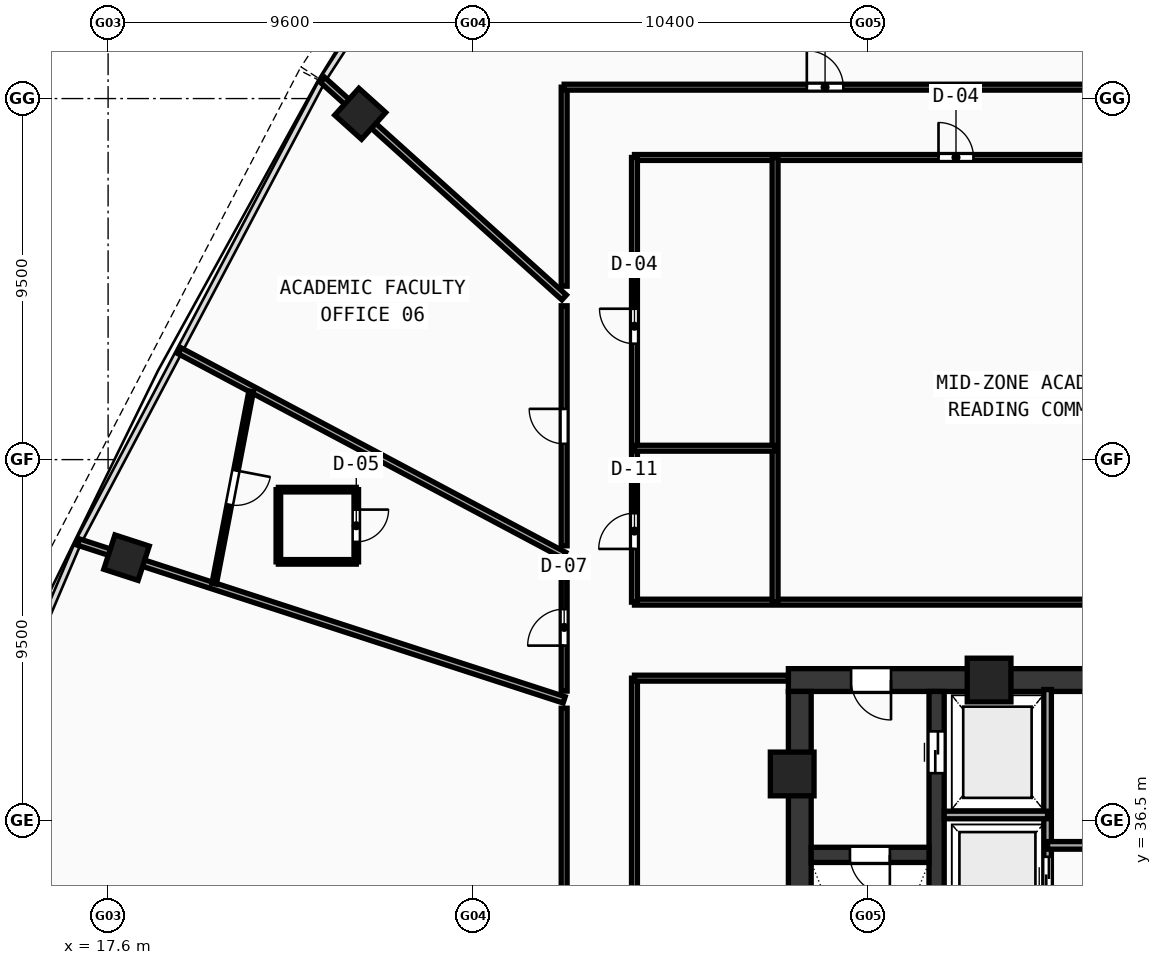
"""IFC4 building model, lengths in metres.
Left out: names, types, materials, properties, quantities, classifications, styles, units other than length and angle.
Written with IfcOpenShell. Run it as: python <this file> out.ifc"""

import sys

from ifc_helpers import new_model, si_unit, direction, frame, frame_2d, origin, origin_with_axes, origin_2d, place, context, subcontext, project, spatial, rectangle, hollow_rectangle, extrude, source, transform, mapped, element, fill, save


model = new_model("IFC4")
c1 = context("Model", 3, precision=1e-05, world=origin(), true_north=direction((0.0, 1.0)))
c2 = subcontext(c1, "Body", "Model", "MODEL_VIEW")
j1 = project(units=[si_unit("LENGTHUNIT", "METRE"), si_unit("PLANEANGLEUNIT", "RADIAN")], contexts=[c1])
p1 = place(None, origin())
s1 = spatial("IfcSite", under=j1, at=p1, CompositionType="ELEMENT")
p2 = place(p1, origin())
s2 = spatial("IfcBuilding", under=s1, at=p2, CompositionType="ELEMENT")
p3 = place(p2, frame((0.0, 0.0, 155.59)))
s3 = spatial("IfcBuildingStorey", under=s2, at=p3, CompositionType="ELEMENT", Elevation=155.59)
p4 = place(p3, frame((35.5, 40.2, 0.0), z_axis=(0.0, 0.0, 1.0), x_axis=(1.0, 0.0, 0.0)))
e1 = element("IfcWall", 1, at=p4, inside=s3, PredefinedType="SHEAR", context=c2, shape_type="SweptSolid", body=[
    extrude(rectangle(XDim=11.3, YDim=0.6, at=frame_2d((5.65, 0.0))), origin(), (0.0, 0.0, 1.0), 3.42),
])
p5 = place(p4, frame((1.65, 0.0, 0.0)))
e2 = element("IfcOpeningElement", 2, at=p5, cuts=e1, PredefinedType="OPENING", context=c2, shape_type="SweptSolid", body=[
    extrude(rectangle(XDim=1.05, YDim=2.1, at=frame_2d((0.525, 1.05))), frame((0.0, 0.31, 0.0), z_axis=(0.0, -1.0, 0.0), x_axis=(1.0, 0.0, 0.0)), (0.0, 0.0, 1.0), 0.62),
])
p6 = place(p3, frame((35.8, 27.8, 0.0), z_axis=(0.0, 0.0, 1.0), x_axis=(0.0, 1.0, 0.0)))
e3 = element("IfcWall", 3, at=p6, inside=s3, PredefinedType="SHEAR", context=c2, shape_type="SweptSolid", body=[
    extrude(rectangle(XDim=12.1, YDim=0.6, at=frame_2d((6.05, 0.0))), origin(), (0.0, 0.0, 1.0), 3.42),
])
p7 = place(p3, frame((39.4, 27.8, 0.0), z_axis=(0.0, 0.0, 1.0), x_axis=(0.0, 1.0, 0.0)))
e4 = element("IfcWall", 4, at=p7, inside=s3, PredefinedType="SHEAR", context=c2, shape_type="SweptSolid", body=[
    extrude(rectangle(XDim=12.1, YDim=0.4, at=frame_2d((6.05, 0.0))), origin(), (0.0, 0.0, 1.0), 3.42),
])
p8 = place(p7, frame((9.95, 0.0, 0.0)))
e5 = element("IfcOpeningElement", 5, at=p8, cuts=e4, PredefinedType="OPENING", context=c2, shape_type="SweptSolid", body=[
    extrude(rectangle(XDim=1.1, YDim=2.1, at=frame_2d((0.55, 1.05))), frame((0.0, 0.21, 0.0), z_axis=(0.0, -1.0, 0.0), x_axis=(1.0, 0.0, 0.0)), (0.0, 0.0, 1.0), 0.42),
])
p9 = place(p3, frame((36.1, 35.6, 0.0), z_axis=(0.0, 0.0, 1.0), x_axis=(1.0, 0.0, 0.0)))
e6 = element("IfcWall", 6, at=p9, inside=s3, PredefinedType="SHEAR", context=c2, shape_type="SweptSolid", body=[
    extrude(rectangle(XDim=3.1, YDim=0.4, at=frame_2d((1.55, 0.0))), origin(), (0.0, 0.0, 1.0), 3.42),
])
p10 = place(p9, frame((1.02, 0.0, 0.0)))
e7 = element("IfcOpeningElement", 7, at=p10, cuts=e6, PredefinedType="OPENING", context=c2, shape_type="SweptSolid", body=[
    extrude(rectangle(XDim=1.05, YDim=2.1, at=frame_2d((0.525, 1.05))), frame((0.0, 0.21, 0.0), z_axis=(0.0, -1.0, 0.0), x_axis=(1.0, 0.0, 0.0)), (0.0, 0.0, 1.0), 0.42),
])
m1 = source(origin(), c2, "Body", "SweptSolid", [
    extrude(hollow_rectangle(XDim=1.15, YDim=1.15, WallThickness=0.048, at=origin_2d()), origin(), (0.0, 0.0, 1.0), 3.68),
])
for number, where, z_axis, x_axis in (
    (8, (40.781, 40.2, -0.26), (0.0, 0.0, 1.0), (1.0, 0.0, 0.0)),
    (9, (35.6, 37.729, -0.26), (0.0, 0.0, 1.0), (1.0, 0.0, 0.0)),
):
    element("IfcColumn", number, at=place(p3, frame(where, z_axis=z_axis, x_axis=x_axis)), inside=s3, PredefinedType="COLUMN", context=c2, shape_type="MappedRepresentation", body=[
        mapped(m1, transform((0.0, 0.0, 0.0), scale=1.0)),
    ])
m2 = source(origin(), c2, "Body", "SweptSolid", [
    extrude(hollow_rectangle(XDim=0.95, YDim=0.95, WallThickness=0.04, at=origin_2d()), origin(), (0.0, 0.0, 1.0), 3.68),
])
for number, where, z_axis, x_axis in (
    (10, (24.234, 55.099, -0.26), (0.0, 0.0, 1.0), (-0.669, -0.743, 0.0)),
    (11, (18.085, 43.42, -0.26), (0.0, 0.0, 1.0), (-0.309, -0.951, 0.0)),
):
    element("IfcColumn", number, at=place(p3, frame(where, z_axis=z_axis, x_axis=x_axis)), inside=s3, PredefinedType="COLUMN", context=c2, shape_type="MappedRepresentation", body=[
        mapped(m2, transform((0.0, 0.0, 0.0), scale=1.0)),
    ])
p11 = place(p3, frame((42.32, 33.5, 0.0), z_axis=(0.0, 0.0, 1.0), x_axis=(0.0, 1.0, 0.0)))
e12 = element("IfcWall", 12, at=p11, inside=s3, PredefinedType="SOLIDWALL", context=c2, shape_type="SweptSolid", body=[
    extrude(rectangle(XDim=6.45, YDim=0.2, at=frame_2d((3.225, 0.0))), origin(), (0.0, 0.0, 1.0), 3.42),
])
p12 = place(p11, frame((1.0, 0.0, 0.0)))
e13 = element("IfcOpeningElement", 13, at=p12, cuts=e12, PredefinedType="OPENING", context=c2, shape_type="SweptSolid", body=[
    extrude(rectangle(XDim=1.05, YDim=2.1, at=frame_2d((0.525, 1.05))), frame((0.0, 0.11, 0.0), z_axis=(0.0, -1.0, 0.0), x_axis=(1.0, 0.0, 0.0)), (0.0, 0.0, 1.0), 0.22),
])
p13 = place(p3, frame((39.6, 36.65, 0.0), z_axis=(0.0, 0.0, 1.0), x_axis=(1.0, 0.0, 0.0)))
e14 = element("IfcWall", 14, at=p13, inside=s3, PredefinedType="SOLIDWALL", context=c2, shape_type="SweptSolid", body=[
    extrude(rectangle(XDim=2.72, YDim=0.2, at=frame_2d((1.36, 0.0))), origin(), (0.0, 0.0, 1.0), 3.42),
])
p14 = place(p3, frame((42.32, 35.85, 0.0), z_axis=(0.0, 0.0, 1.0), x_axis=(1.0, 0.0, 0.0)))
e15 = element("IfcWall", 15, at=p14, inside=s3, PredefinedType="SOLIDWALL", context=c2, shape_type="SweptSolid", body=[
    extrude(rectangle(XDim=4.73, YDim=0.2, at=frame_2d((2.365, 0.0))), origin(), (0.0, 0.0, 1.0), 3.42),
])
p15 = place(p14, frame((1.8, 0.0, 0.0)))
e16 = element("IfcOpeningElement", 16, at=p15, cuts=e15, PredefinedType="OPENING", context=c2, shape_type="SweptSolid", body=[
    extrude(rectangle(XDim=0.9, YDim=2.1, at=frame_2d((0.45, 1.05))), frame((0.0, 0.11, 0.0), z_axis=(0.0, -1.0, 0.0), x_axis=(1.0, 0.0, 0.0)), (0.0, 0.0, 1.0), 0.22),
])
p16 = place(p3, frame((31.45, 42.25, 0.0), z_axis=(0.0, 0.0, 1.0), x_axis=(1.0, 0.0, 0.0)))
e17 = element("IfcWall", 17, at=p16, inside=s3, PredefinedType="PARTITIONING", context=c2, shape_type="SweptSolid", body=[
    extrude(rectangle(XDim=33.1, YDim=0.155, at=frame_2d((16.55, 0.0))), origin(), (0.0, 0.0, 1.0), 2.77),
])
p17 = place(p3, frame((31.45, 53.95, 0.0), z_axis=(0.0, 0.0, 1.0), x_axis=(1.0, 0.0, 0.0)))
e18 = element("IfcWall", 18, at=p17, inside=s3, PredefinedType="PARTITIONING", context=c2, shape_type="SweptSolid", body=[
    extrude(rectangle(XDim=33.1, YDim=0.155, at=frame_2d((16.55, 0.0))), origin(), (0.0, 0.0, 1.0), 2.77),
])
p18 = place(p17, frame((8.0, 0.0, 0.0)))
e19 = element("IfcOpeningElement", 19, at=p18, cuts=e18, PredefinedType="OPENING", context=c2, shape_type="SweptSolid", body=[
    extrude(rectangle(XDim=0.92, YDim=2.1, at=frame_2d((0.46, 1.05))), frame((0.0, 0.087, 0.0), z_axis=(0.0, -1.0, 0.0), x_axis=(1.0, 0.0, 0.0)), (0.0, 0.0, 1.0), 0.175),
])
p19 = place(p17, frame((20.55, 0.0, 0.0)))
e20 = element("IfcOpeningElement", 20, at=p19, cuts=e18, PredefinedType="OPENING", context=c2, shape_type="SweptSolid", body=[
    extrude(rectangle(XDim=0.92, YDim=2.1, at=frame_2d((0.46, 1.05))), frame((0.0, 0.087, 0.0), z_axis=(0.0, -1.0, 0.0), x_axis=(1.0, 0.0, 0.0)), (0.0, 0.0, 1.0), 0.175),
])
p20 = place(p3, frame((31.45, 42.25, 0.0), z_axis=(0.0, 0.0, 1.0), x_axis=(0.0, 1.0, 0.0)))
e21 = element("IfcWall", 21, at=p20, inside=s3, PredefinedType="PARTITIONING", context=c2, shape_type="SweptSolid", body=[
    extrude(rectangle(XDim=11.7, YDim=0.155, at=frame_2d((5.85, 0.0))), origin(), (0.0, 0.0, 1.0), 2.77),
])
p21 = place(p20, frame((1.4, 0.0, 0.0)))
e22 = element("IfcOpeningElement", 22, at=p21, cuts=e21, PredefinedType="OPENING", context=c2, shape_type="SweptSolid", body=[
    extrude(rectangle(XDim=0.94, YDim=2.1, at=frame_2d((0.47, 1.05))), frame((0.0, 0.087, 0.0), z_axis=(0.0, -1.0, 0.0), x_axis=(1.0, 0.0, 0.0)), (0.0, 0.0, 1.0), 0.175),
])
p22 = place(p20, frame((6.8, 0.0, 0.0)))
e23 = element("IfcOpeningElement", 23, at=p22, cuts=e21, PredefinedType="OPENING", context=c2, shape_type="SweptSolid", body=[
    extrude(rectangle(XDim=0.92, YDim=2.1, at=frame_2d((0.46, 1.05))), frame((0.0, 0.087, 0.0), z_axis=(0.0, -1.0, 0.0), x_axis=(1.0, 0.0, 0.0)), (0.0, 0.0, 1.0), 0.175),
])
p23 = place(p3, frame((35.15, 42.25, 0.0), z_axis=(0.0, 0.0, 1.0), x_axis=(0.0, 1.0, 0.0)))
e24 = element("IfcWall", 24, at=p23, inside=s3, PredefinedType="PARTITIONING", context=c2, shape_type="SweptSolid", body=[
    extrude(rectangle(XDim=11.7, YDim=0.155, at=frame_2d((5.85, 0.0))), origin(), (0.0, 0.0, 1.0), 2.77),
])
p24 = place(p3, frame((31.45, 46.3, 0.0), z_axis=(0.0, 0.0, 1.0), x_axis=(1.0, 0.0, 0.0)))
e25 = element("IfcWall", 25, at=p24, inside=s3, PredefinedType="PARTITIONING", context=c2, shape_type="SweptSolid", body=[
    extrude(rectangle(XDim=3.7, YDim=0.155, at=frame_2d((1.85, 0.0))), origin(), (0.0, 0.0, 1.0), 2.77),
])
p25 = place(p3, frame((31.45, 23.65, 0.0), z_axis=(0.0, 0.0, 1.0), x_axis=(0.0, 1.0, 0.0)))
e26 = element("IfcWall", 26, at=p25, inside=s3, PredefinedType="PARTITIONING", context=c2, shape_type="SweptSolid", body=[
    extrude(rectangle(XDim=16.6, YDim=0.155, at=frame_2d((8.3, 0.0))), origin(), (0.0, 0.0, 1.0), 2.77),
])
p26 = place(p25, frame((7.5, 0.0, 0.0)))
e27 = element("IfcOpeningElement", 27, at=p26, cuts=e26, PredefinedType="OPENING", context=c2, shape_type="SweptSolid", body=[
    extrude(rectangle(XDim=0.9, YDim=2.08, at=frame_2d((0.45, 1.04))), frame((0.0, 0.087, 0.0), z_axis=(0.0, -1.0, 0.0), x_axis=(1.0, 0.0, 0.0)), (0.0, 0.0, 1.0), 0.175),
])
p27 = place(p3, frame((31.45, 40.25, 0.0), z_axis=(0.0, 0.0, 1.0), x_axis=(1.0, 0.0, 0.0)))
e28 = element("IfcWall", 28, at=p27, inside=s3, PredefinedType="PARTITIONING", context=c2, shape_type="SweptSolid", body=[
    extrude(rectangle(XDim=4.05, YDim=0.155, at=frame_2d((2.025, 0.0))), origin(), (0.0, 0.0, 1.0), 3.42),
])
p28 = place(p3, frame((29.6, 50.267, 0.0), z_axis=(0.0, 0.0, 1.0), x_axis=(-0.743147926867, 0.669127161901, 0.0)))
e29 = element("IfcWall", 29, at=p28, inside=s3, PredefinedType="PARTITIONING", context=c2, shape_type="SweptSolid", body=[
    extrude(rectangle(XDim=8.552, YDim=0.175, at=frame_2d((4.276, 0.0))), origin(), (0.0, 0.0, 1.0), 2.77),
])
p29 = place(p3, frame((29.6, 43.483, 0.0), z_axis=(0.0, 0.0, 1.0), x_axis=(-0.882944706502, 0.469476991193, 0.0)))
e30 = element("IfcWall", 30, at=p29, inside=s3, PredefinedType="PARTITIONING", context=c2, shape_type="SweptSolid", body=[
    extrude(rectangle(XDim=11.464, YDim=0.175, at=frame_2d((5.732, 0.0))), origin(), (0.0, 0.0, 1.0), 2.77),
])
p30 = place(p3, frame((29.6, 39.678, 0.0), z_axis=(0.0, 0.0, 1.0), x_axis=(-0.951059027278, 0.309009266259, 0.0)))
e31 = element("IfcWall", 31, at=p30, inside=s3, PredefinedType="PARTITIONING", context=c2, shape_type="SweptSolid", body=[
    extrude(rectangle(XDim=13.441, YDim=0.175, at=frame_2d((6.72, 0.0))), origin(), (0.0, 0.0, 1.0), 2.77),
])
p31 = place(p3, frame((29.6, 21.8, 0.0), z_axis=(0.0, 0.0, 1.0), x_axis=(0.0, 1.0, 0.0)))
e32 = element("IfcWall", 32, at=p31, inside=s3, PredefinedType="PARTITIONING", context=c2, shape_type="SweptSolid", body=[
    extrude(rectangle(XDim=17.659, YDim=0.155, at=frame_2d((8.829, 0.0))), origin(), (0.0, 0.0, 1.0), 2.77),
])
p32 = place(p31, frame((8.234, 0.0, 0.0)))
e33 = element("IfcOpeningElement", 33, at=p32, cuts=e32, PredefinedType="OPENING", context=c2, shape_type="SweptSolid", body=[
    extrude(rectangle(XDim=0.96, YDim=2.12, at=frame_2d((0.48, 1.06))), frame((0.0, 0.087, 0.0), z_axis=(0.0, -1.0, 0.0), x_axis=(1.0, 0.0, 0.0)), (0.0, 0.0, 1.0), 0.175),
])
p33 = place(p3, frame((29.6, 39.91, 0.0), z_axis=(0.0, 0.0, 1.0), x_axis=(0.0, 1.0, 0.0)))
e34 = element("IfcWall", 34, at=p33, inside=s3, PredefinedType="PARTITIONING", context=c2, shape_type="SweptSolid", body=[
    extrude(rectangle(XDim=3.354, YDim=0.155, at=frame_2d((1.677, 0.0))), origin(), (0.0, 0.0, 1.0), 3.02),
])
p34 = place(p33, frame((1.196, 0.0, 0.0)))
e35 = element("IfcOpeningElement", 35, at=p34, cuts=e34, PredefinedType="OPENING", context=c2, shape_type="SweptSolid", body=[
    extrude(rectangle(XDim=0.96, YDim=2.12, at=frame_2d((0.48, 1.06))), frame((0.0, 0.087, 0.0), z_axis=(0.0, -1.0, 0.0), x_axis=(1.0, 0.0, 0.0)), (0.0, 0.0, 1.0), 0.175),
])
p35 = place(p3, frame((29.6, 43.733, 0.0), z_axis=(0.0, 0.0, 1.0), x_axis=(0.0, 1.0, 0.0)))
e36 = element("IfcWall", 36, at=p35, inside=s3, PredefinedType="PARTITIONING", context=c2, shape_type="SweptSolid", body=[
    extrude(rectangle(XDim=6.315, YDim=0.155, at=frame_2d((3.157, 0.0))), origin(), (0.0, 0.0, 1.0), 2.77),
])
p36 = place(p35, frame((2.683, 0.0, 0.0)))
e37 = element("IfcOpeningElement", 37, at=p36, cuts=e36, PredefinedType="OPENING", context=c2, shape_type="SweptSolid", body=[
    extrude(rectangle(XDim=0.92, YDim=2.1, at=frame_2d((0.46, 1.05))), frame((0.0, 0.087, 0.0), z_axis=(0.0, -1.0, 0.0), x_axis=(1.0, 0.0, 0.0)), (0.0, 0.0, 1.0), 0.175),
])
p37 = place(p3, frame((29.6, 50.563, 0.0), z_axis=(0.0, 0.0, 1.0), x_axis=(0.0, 1.0, 0.0)))
e38 = element("IfcWall", 38, at=p37, inside=s3, PredefinedType="PARTITIONING", context=c2, shape_type="SweptSolid", body=[
    extrude(rectangle(XDim=5.237, YDim=0.155, at=frame_2d((2.618, 0.0))), origin(), (0.0, 0.0, 1.0), 3.02),
])
p38 = place(p3, frame((29.6, 55.8, 0.0), z_axis=(0.0, 0.0, 1.0), x_axis=(1.0, 0.0, 0.0)))
e39 = element("IfcWall", 39, at=p38, inside=s3, PredefinedType="PARTITIONING", context=c2, shape_type="SweptSolid", body=[
    extrude(rectangle(XDim=14.109, YDim=0.155, at=frame_2d((7.054, 0.0))), origin(), (0.0, 0.0, 1.0), 2.77),
])
p39 = place(p38, frame((6.385, 0.0, 0.0)))
e40 = element("IfcOpeningElement", 40, at=p39, cuts=e39, PredefinedType="OPENING", context=c2, shape_type="SweptSolid", body=[
    extrude(rectangle(XDim=0.96, YDim=2.12, at=frame_2d((0.48, 1.06))), frame((0.0, 0.087, 0.0), z_axis=(0.0, -1.0, 0.0), x_axis=(1.0, 0.0, 0.0)), (0.0, 0.0, 1.0), 0.175),
])
p40 = place(p3, frame((22.08, 43.31, 0.0), z_axis=(0.0, 0.0, 1.0), x_axis=(1.0, 0.0, 0.0)))
e41 = element("IfcWall", 41, at=p40, inside=s3, PredefinedType="PARTITIONING", context=c2, shape_type="SweptSolid", body=[
    extrude(rectangle(XDim=2.05, YDim=0.12, at=frame_2d((1.025, 0.0))), origin(), (0.0, 0.0, 1.0), 3.42),
])
p41 = place(p3, frame((24.13, 43.31, 0.0), z_axis=(0.0, 0.0, 1.0), x_axis=(0.0, 1.0, 0.0)))
e42 = element("IfcWall", 42, at=p41, inside=s3, PredefinedType="PARTITIONING", context=c2, shape_type="SweptSolid", body=[
    extrude(rectangle(XDim=1.9, YDim=0.12, at=frame_2d((0.95, 0.0))), origin(), (0.0, 0.0, 1.0), 3.42),
])
p42 = place(p41, frame((0.525, 0.0, 0.0)))
e43 = element("IfcOpeningElement", 43, at=p42, cuts=e42, PredefinedType="OPENING", context=c2, shape_type="SweptSolid", body=[
    extrude(rectangle(XDim=0.85, YDim=2.1, at=frame_2d((0.425, 1.05))), frame((0.0, 0.07, 0.0), z_axis=(0.0, -1.0, 0.0), x_axis=(1.0, 0.0, 0.0)), (0.0, 0.0, 1.0), 0.14),
])
p43 = place(p3, frame((24.13, 45.21, 0.0), z_axis=(0.0, 0.0, 1.0), x_axis=(-1.0, 0.0, 0.0)))
e44 = element("IfcWall", 44, at=p43, inside=s3, PredefinedType="PARTITIONING", context=c2, shape_type="SweptSolid", body=[
    extrude(rectangle(XDim=2.05, YDim=0.12, at=frame_2d((1.025, 0.0))), origin(), (0.0, 0.0, 1.0), 3.42),
])
p44 = place(p3, frame((22.08, 45.21, 0.0), z_axis=(0.0, 0.0, 1.0), x_axis=(0.0, -1.0, 0.0)))
e45 = element("IfcWall", 45, at=p44, inside=s3, PredefinedType="PARTITIONING", context=c2, shape_type="SweptSolid", body=[
    extrude(rectangle(XDim=1.9, YDim=0.12, at=frame_2d((0.95, 0.0))), origin(), (0.0, 0.0, 1.0), 3.42),
])
p45 = place(p3, frame((21.364, 47.795, 0.0), z_axis=(0.0, 0.0, 1.0), x_axis=(-0.188731428073, -0.982028740953, 0.0)))
e46 = element("IfcWall", 46, at=p45, inside=s3, PredefinedType="PARTITIONING", context=c2, shape_type="SweptSolid", body=[
    extrude(rectangle(XDim=5.154, YDim=0.12, at=frame_2d((2.577, 0.0))), origin(), (0.0, 0.0, 1.0), 2.77),
])
p46 = place(p45, frame((2.117, 0.0, 0.0)))
e47 = element("IfcOpeningElement", 47, at=p46, cuts=e46, PredefinedType="OPENING", context=c2, shape_type="SweptSolid", body=[
    extrude(rectangle(XDim=0.92, YDim=2.1, at=frame_2d((0.46, 1.05))), frame((0.0, 0.07, 0.0), z_axis=(0.0, -1.0, 0.0), x_axis=(1.0, 0.0, 0.0)), (0.0, 0.0, 1.0), 0.14),
])
m3 = source(origin(), c2, "Body", "SweptSolid", [
    extrude(rectangle(XDim=1.05, YDim=2.1, at=frame_2d((0.525, 1.05))), frame((0.0, 0.025, 0.0), z_axis=(0.0, -1.0, 0.0), x_axis=(1.0, 0.0, 0.0)), (0.0, 0.0, 1.0), 0.05),
])
p47 = place(p10, frame((1.05, 0.0, 0.0), z_axis=(0.0, 0.0, 1.0), x_axis=(-1.0, 0.0, 0.0)))
e48 = element("IfcDoor", 48, at=p47, inside=s3, OperationType="SINGLE_SWING_LEFT", PredefinedType="DOOR", context=c2, shape_type="MappedRepresentation", body=[
    mapped(m3, transform((0.0, 0.0, 0.0), scale=1.0)),
])
fill(e7, e48)
p48 = place(p5, frame((1.05, 0.0, 0.0), z_axis=(0.0, 0.0, 1.0), x_axis=(-1.0, 0.0, 0.0)))
e49 = element("IfcDoor", 49, at=p48, inside=s3, OperationType="SINGLE_SWING_LEFT", PredefinedType="DOOR", context=c2, shape_type="MappedRepresentation", body=[
    mapped(m3, transform((0.0, 0.0, 0.0), scale=1.0)),
])
fill(e2, e49)
m4 = source(origin(), c2, "Body", "SweptSolid", [
    extrude(rectangle(XDim=1.1, YDim=2.1, at=frame_2d((0.55, 1.05))), frame((0.0, 0.025, 0.0), z_axis=(0.0, -1.0, 0.0), x_axis=(1.0, 0.0, 0.0)), (0.0, 0.0, 1.0), 0.05),
])
p49 = place(p8, frame((1.1, 0.0, 0.0), z_axis=(0.0, 0.0, 1.0), x_axis=(-1.0, 0.0, 0.0)))
e50 = element("IfcDoor", 50, at=p49, inside=s3, OperationType="DOUBLE_DOOR_SLIDING", PredefinedType="DOOR", context=c2, shape_type="MappedRepresentation", body=[
    mapped(m4, transform((0.0, 0.0, 0.0), scale=1.0)),
])
fill(e5, e50)
p50 = place(p12, origin_with_axes())
e51 = element("IfcDoor", 51, at=p50, inside=s3, OperationType="DOUBLE_DOOR_SLIDING", PredefinedType="DOOR", context=c2, shape_type="MappedRepresentation", body=[
    mapped(m3, transform((0.0, 0.0, 0.0), scale=1.0)),
])
fill(e13, e51)
m5 = source(origin(), c2, "Body", "SweptSolid", [
    extrude(rectangle(XDim=0.94, YDim=2.1, at=frame_2d((0.47, 1.05))), frame((0.0, 0.025, 0.0), z_axis=(0.0, -1.0, 0.0), x_axis=(1.0, 0.0, 0.0)), (0.0, 0.0, 1.0), 0.05),
])
p51 = place(p21, origin_with_axes())
e52 = element("IfcDoor", 52, at=p51, inside=s3, OperationType="SINGLE_SWING_LEFT", PredefinedType="DOOR", context=c2, shape_type="MappedRepresentation", body=[
    mapped(m5, transform((0.0, 0.0, 0.0), scale=1.0)),
])
fill(e22, e52)
m6 = source(origin(), c2, "Body", "SweptSolid", [
    extrude(rectangle(XDim=0.92, YDim=2.1, at=frame_2d((0.46, 1.05))), frame((0.0, 0.025, 0.0), z_axis=(0.0, -1.0, 0.0), x_axis=(1.0, 0.0, 0.0)), (0.0, 0.0, 1.0), 0.05),
])
p52 = place(p22, origin_with_axes())
e53 = element("IfcDoor", 53, at=p52, inside=s3, OperationType="SINGLE_SWING_RIGHT", PredefinedType="DOOR", context=c2, shape_type="MappedRepresentation", body=[
    mapped(m6, transform((0.0, 0.0, 0.0), scale=1.0)),
])
fill(e23, e53)
p53 = place(p18, origin_with_axes())
e54 = element("IfcDoor", 54, at=p53, inside=s3, OperationType="SINGLE_SWING_LEFT", PredefinedType="DOOR", context=c2, shape_type="MappedRepresentation", body=[
    mapped(m6, transform((0.0, 0.0, 0.0), scale=1.0)),
])
fill(e19, e54)
m7 = source(origin(), c2, "Body", "SweptSolid", [
    extrude(rectangle(XDim=0.96, YDim=2.12, at=frame_2d((0.48, 1.06))), frame((0.0, 0.025, 0.0), z_axis=(0.0, -1.0, 0.0), x_axis=(1.0, 0.0, 0.0)), (0.0, 0.0, 1.0), 0.05),
])
p54 = place(p39, origin_with_axes())
e55 = element("IfcDoor", 55, at=p54, inside=s3, OperationType="SINGLE_SWING_LEFT", PredefinedType="DOOR", context=c2, shape_type="MappedRepresentation", body=[
    mapped(m7, transform((0.0, 0.0, 0.0), scale=1.0)),
])
fill(e40, e55)
p55 = place(p36, origin_with_axes())
e56 = element("IfcDoor", 56, at=p55, inside=s3, OperationType="SINGLE_SWING_RIGHT", PredefinedType="DOOR", context=c2, shape_type="MappedRepresentation", body=[
    mapped(m6, transform((0.0, 0.0, 0.0), scale=1.0)),
])
fill(e37, e56)
p56 = place(p34, origin_with_axes())
e57 = element("IfcDoor", 57, at=p56, inside=s3, OperationType="SINGLE_SWING_LEFT", PredefinedType="DOOR", context=c2, shape_type="MappedRepresentation", body=[
    mapped(m7, transform((0.0, 0.0, 0.0), scale=1.0)),
])
fill(e35, e57)
m8 = source(origin(), c2, "Body", "SweptSolid", [
    extrude(rectangle(XDim=0.85, YDim=2.1, at=frame_2d((0.425, 1.05))), frame((0.0, 0.025, 0.0), z_axis=(0.0, -1.0, 0.0), x_axis=(1.0, 0.0, 0.0)), (0.0, 0.0, 1.0), 0.05),
])
p57 = place(p42, frame((0.85, 0.0, 0.0), z_axis=(0.0, 0.0, 1.0), x_axis=(-1.0, 0.0, 0.0)))
e58 = element("IfcDoor", 58, at=p57, inside=s3, OperationType="SINGLE_SWING_LEFT", PredefinedType="DOOR", context=c2, shape_type="MappedRepresentation", body=[
    mapped(m8, transform((0.0, 0.0, 0.0), scale=1.0)),
])
fill(e43, e58)
p58 = place(p46, origin_with_axes())
e59 = element("IfcDoor", 59, at=p58, inside=s3, OperationType="SINGLE_SWING_LEFT", PredefinedType="DOOR", context=c2, shape_type="MappedRepresentation", body=[
    mapped(m6, transform((0.0, 0.0, 0.0), scale=1.0)),
])
fill(e47, e59)
save(model, sys.argv[1])
